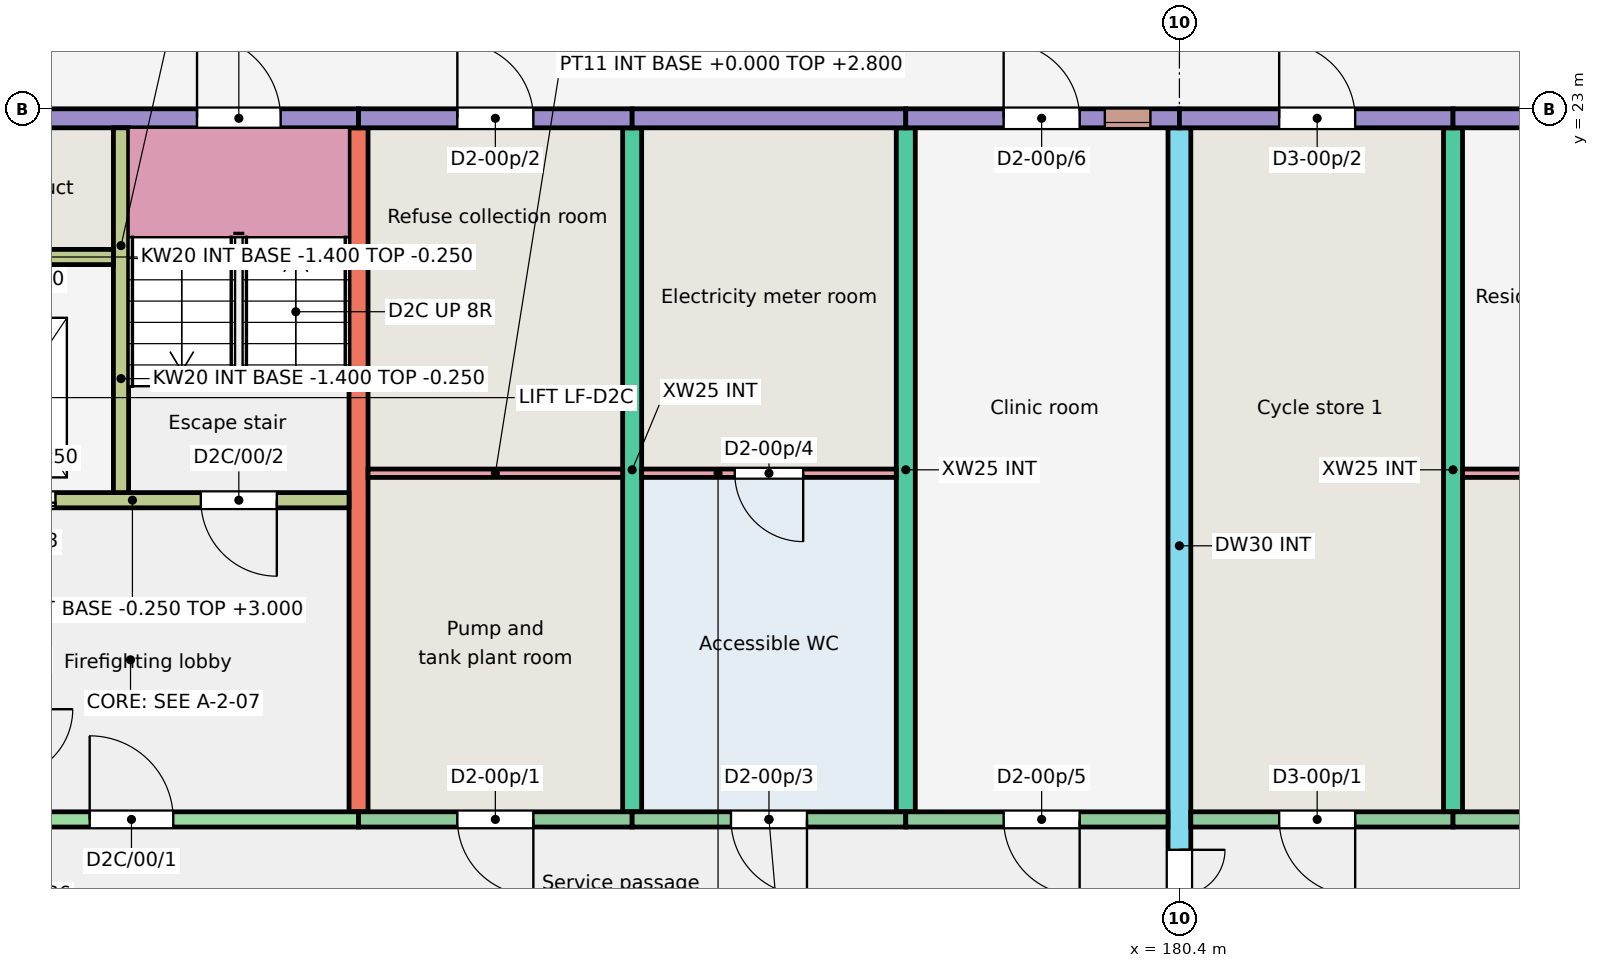
"""IFC4 building model, lengths in metres.
Left out: names, types, materials, properties, quantities, classifications, styles, units other than length and angle.
Written with IfcOpenShell. Run it as: python <this file> out.ifc"""

import sys

from ifc_helpers import new_model, si_unit, direction, frame, frame_2d, origin, place, context, subcontext, project, spatial, rectangle, extrude, element, fill, save


model = new_model("IFC4")
c1 = context("Model", 3, precision=1e-05, world=origin(), true_north=direction((0.0, 1.0)))
c2 = subcontext(c1, "Body", "Model", "MODEL_VIEW")
j1 = project(units=[si_unit("LENGTHUNIT", "METRE"), si_unit("PLANEANGLEUNIT", "RADIAN")], contexts=[c1])
p1 = place(None, origin())
s1 = spatial("IfcSite", under=j1, at=p1, CompositionType="ELEMENT")
p2 = place(p1, origin())
s2 = spatial("IfcBuilding", under=s1, at=p2, CompositionType="ELEMENT")
p3 = place(p2, origin())
s3 = spatial("IfcBuildingStorey", under=s2, at=p3, CompositionType="ELEMENT", Elevation=0.0)
for number, where, z_axis, x_axis in (
    (1, (169.6, 13.75, -0.25), (0.0, 0.0, 1.0), (0.0, 1.0, 0.0)),
    (2, (173.2, 13.75, -0.25), (0.0, 0.0, 1.0), (0.0, 1.0, 0.0)),
    (3, (176.8, 13.75, -0.25), (0.0, 0.0, 1.0), (0.0, 1.0, 0.0)),
):
    element("IfcWall", number, at=place(p3, frame(where, z_axis=z_axis, x_axis=x_axis)), inside=s3, PredefinedType="SHEAR", context=c2, shape_type="SweptSolid", body=[
        extrude(rectangle(XDim=9.0, YDim=0.25, at=frame_2d((4.5, 0.0))), origin(), (0.0, 0.0, 1.0), 3.25),
    ])
p4 = place(p3, frame((180.4, 11.75, -0.25), z_axis=(0.0, 0.0, 1.0), x_axis=(0.0, 1.0, 0.0)))
e4 = element("IfcWall", 4, at=p4, inside=s3, PredefinedType="SHEAR", context=c2, shape_type="SweptSolid", body=[
    extrude(rectangle(XDim=11.0, YDim=0.3, at=frame_2d((5.5, 0.0))), origin(), (0.0, 0.0, 1.0), 3.25),
])
p5 = place(p4, frame((0.3, 0.0, 0.25)))
e5 = element("IfcOpeningElement", 5, at=p5, cuts=e4, PredefinedType="OPENING", context=c2, shape_type="SweptSolid", body=[
    extrude(rectangle(XDim=1.2, YDim=2.1, at=frame_2d((0.6, 1.05))), frame((0.0, 0.16, 0.0), z_axis=(0.0, -1.0, 0.0), x_axis=(1.0, 0.0, 0.0)), (0.0, 0.0, 1.0), 0.32),
])
p6 = place(p3, frame((184.0, 13.75, -0.25), z_axis=(0.0, 0.0, 1.0), x_axis=(0.0, 1.0, 0.0)))
e6 = element("IfcWall", 6, at=p6, inside=s3, PredefinedType="SHEAR", context=c2, shape_type="SweptSolid", body=[
    extrude(rectangle(XDim=9.0, YDim=0.25, at=frame_2d((4.5, 0.0))), origin(), (0.0, 0.0, 1.0), 3.25),
])
p7 = place(p3, frame((163.6, 22.875, -0.25), z_axis=(0.0, 0.0, 1.0), x_axis=(1.0, 0.0, 0.0)))
e7 = element("IfcWall", 7, at=p7, inside=s3, PredefinedType="SOLIDWALL", context=c2, shape_type="SweptSolid", body=[
    extrude(rectangle(XDim=6.0, YDim=0.25, at=frame_2d((3.0, 0.0))), origin(), (0.0, 0.0, 1.0), 3.25),
])
p8 = place(p7, frame((3.875, 0.0, 0.25)))
e8 = element("IfcOpeningElement", 8, at=p8, cuts=e7, PredefinedType="OPENING", context=c2, shape_type="SweptSolid", body=[
    extrude(rectangle(XDim=1.1, YDim=2.1, at=frame_2d((0.55, 1.05))), frame((0.0, 0.135, 0.0), z_axis=(0.0, -1.0, 0.0), x_axis=(1.0, 0.0, 0.0)), (0.0, 0.0, 1.0), 0.27),
])
p9 = place(p3, frame((163.75, 13.65, -0.25), z_axis=(0.0, 0.0, 1.0), x_axis=(1.0, 0.0, 0.0)))
e9 = element("IfcWall", 9, at=p9, inside=s3, PredefinedType="SHEAR", context=c2, shape_type="SweptSolid", body=[
    extrude(rectangle(XDim=5.85, YDim=0.2, at=frame_2d((2.925, 0.0))), origin(), (0.0, 0.0, 1.0), 3.25),
])
p10 = place(p9, frame((2.312, 0.0, 0.25)))
e10 = element("IfcOpeningElement", 10, at=p10, cuts=e9, PredefinedType="OPENING", context=c2, shape_type="SweptSolid", body=[
    extrude(rectangle(XDim=1.1, YDim=2.1, at=frame_2d((0.55, 1.05))), frame((0.0, 0.11, 0.0), z_axis=(0.0, -1.0, 0.0), x_axis=(1.0, 0.0, 0.0)), (0.0, 0.0, 1.0), 0.22),
])
p11 = place(p3, frame((163.75, 17.85, -0.25), z_axis=(0.0, 0.0, 1.0), x_axis=(1.0, 0.0, 0.0)))
e11 = element("IfcWall", 11, at=p11, inside=s3, PredefinedType="SHEAR", context=c2, shape_type="SweptSolid", body=[
    extrude(rectangle(XDim=5.725, YDim=0.2, at=frame_2d((2.863, 0.0))), origin(), (0.0, 0.0, 1.0), 3.25),
])
p12 = place(p11, frame((3.775, 0.0, 0.25)))
e12 = element("IfcOpeningElement", 12, at=p12, cuts=e11, PredefinedType="OPENING", context=c2, shape_type="SweptSolid", body=[
    extrude(rectangle(XDim=1.0, YDim=2.1, at=frame_2d((0.5, 1.05))), frame((0.0, 0.11, 0.0), z_axis=(0.0, -1.0, 0.0), x_axis=(1.0, 0.0, 0.0)), (0.0, 0.0, 1.0), 0.22),
])
p13 = place(p11, frame((0.762, 0.0, 0.25)))
e13 = element("IfcOpeningElement", 13, at=p13, cuts=e11, PredefinedType="OPENING", context=c2, shape_type="SweptSolid", body=[
    extrude(rectangle(XDim=1.1, YDim=2.1, at=frame_2d((0.55, 1.05))), frame((0.0, 0.11, 0.0), z_axis=(0.0, -1.0, 0.0), x_axis=(1.0, 0.0, 0.0)), (0.0, 0.0, 1.0), 0.22),
])
p14 = place(p3, frame((166.475, 17.95, -0.25), z_axis=(0.0, 0.0, 1.0), x_axis=(0.0, 1.0, 0.0)))
e14 = element("IfcWall", 14, at=p14, inside=s3, PredefinedType="SHEAR", context=c2, shape_type="SweptSolid", body=[
    extrude(rectangle(XDim=4.8, YDim=0.2, at=frame_2d((2.4, 0.0))), origin(), (0.0, 0.0, 1.0), 3.25),
])
p15 = place(p3, frame((163.75, 21.05, -0.25), z_axis=(0.0, 0.0, 1.0), x_axis=(1.0, 0.0, 0.0)))
e15 = element("IfcWall", 15, at=p15, inside=s3, PredefinedType="SHEAR", context=c2, shape_type="SweptSolid", body=[
    extrude(rectangle(XDim=2.625, YDim=0.2, at=frame_2d((1.312, 0.0))), origin(), (0.0, 0.0, 1.0), 3.25),
])
p16 = place(p3, frame((169.6, 22.875, -0.25), z_axis=(0.0, 0.0, 1.0), x_axis=(1.0, 0.0, 0.0)))
e16 = element("IfcWall", 16, at=p16, inside=s3, PredefinedType="SOLIDWALL", context=c2, shape_type="SweptSolid", body=[
    extrude(rectangle(XDim=3.6, YDim=0.25, at=frame_2d((1.8, 0.0))), origin(), (0.0, 0.0, 1.0), 3.25),
])
p17 = place(p16, frame((1.3, 0.0, 0.25)))
e17 = element("IfcOpeningElement", 17, at=p17, cuts=e16, PredefinedType="OPENING", context=c2, shape_type="SweptSolid", body=[
    extrude(rectangle(XDim=1.0, YDim=2.1, at=frame_2d((0.5, 1.05))), frame((0.0, 0.135, 0.0), z_axis=(0.0, -1.0, 0.0), x_axis=(1.0, 0.0, 0.0)), (0.0, 0.0, 1.0), 0.27),
])
p18 = place(p3, frame((169.6, 13.65, -0.25), z_axis=(0.0, 0.0, 1.0), x_axis=(1.0, 0.0, 0.0)))
e18 = element("IfcWall", 18, at=p18, inside=s3, PredefinedType="SOLIDWALL", context=c2, shape_type="SweptSolid", body=[
    extrude(rectangle(XDim=3.6, YDim=0.2, at=frame_2d((1.8, 0.0))), origin(), (0.0, 0.0, 1.0), 3.25),
])
p19 = place(p18, frame((1.3, 0.0, 0.25)))
e19 = element("IfcOpeningElement", 19, at=p19, cuts=e18, PredefinedType="OPENING", context=c2, shape_type="SweptSolid", body=[
    extrude(rectangle(XDim=1.0, YDim=2.1, at=frame_2d((0.5, 1.05))), frame((0.0, 0.11, 0.0), z_axis=(0.0, -1.0, 0.0), x_axis=(1.0, 0.0, 0.0)), (0.0, 0.0, 1.0), 0.22),
])
p20 = place(p3, frame((173.2, 22.875, -0.25), z_axis=(0.0, 0.0, 1.0), x_axis=(1.0, 0.0, 0.0)))
e20 = element("IfcWall", 20, at=p20, inside=s3, PredefinedType="SOLIDWALL", context=c2, shape_type="SweptSolid", body=[
    extrude(rectangle(XDim=3.6, YDim=0.25, at=frame_2d((1.8, 0.0))), origin(), (0.0, 0.0, 1.0), 3.25),
])
p21 = place(p3, frame((173.2, 13.65, -0.25), z_axis=(0.0, 0.0, 1.0), x_axis=(1.0, 0.0, 0.0)))
e21 = element("IfcWall", 21, at=p21, inside=s3, PredefinedType="SOLIDWALL", context=c2, shape_type="SweptSolid", body=[
    extrude(rectangle(XDim=3.6, YDim=0.2, at=frame_2d((1.8, 0.0))), origin(), (0.0, 0.0, 1.0), 3.25),
])
p22 = place(p21, frame((1.3, 0.0, 0.25)))
e22 = element("IfcOpeningElement", 22, at=p22, cuts=e21, PredefinedType="OPENING", context=c2, shape_type="SweptSolid", body=[
    extrude(rectangle(XDim=1.0, YDim=2.1, at=frame_2d((0.5, 1.05))), frame((0.0, 0.11, 0.0), z_axis=(0.0, -1.0, 0.0), x_axis=(1.0, 0.0, 0.0)), (0.0, 0.0, 1.0), 0.22),
])
p23 = place(p3, frame((176.8, 22.875, -0.25), z_axis=(0.0, 0.0, 1.0), x_axis=(1.0, 0.0, 0.0)))
e23 = element("IfcWall", 23, at=p23, inside=s3, PredefinedType="SOLIDWALL", context=c2, shape_type="SweptSolid", body=[
    extrude(rectangle(XDim=3.6, YDim=0.25, at=frame_2d((1.8, 0.0))), origin(), (0.0, 0.0, 1.0), 3.25),
])
p24 = place(p23, frame((2.619, 0.0, 2.05)))
e24 = element("IfcOpeningElement", 24, at=p24, cuts=e23, PredefinedType="OPENING", context=c2, shape_type="SweptSolid", body=[
    extrude(rectangle(XDim=0.6, YDim=0.6, at=frame_2d((0.3, 0.3))), frame((0.0, 0.135, 0.0), z_axis=(0.0, -1.0, 0.0), x_axis=(1.0, 0.0, 0.0)), (0.0, 0.0, 1.0), 0.27),
])
p25 = place(p23, frame((1.288, 0.0, 0.25)))
e25 = element("IfcOpeningElement", 25, at=p25, cuts=e23, PredefinedType="OPENING", context=c2, shape_type="SweptSolid", body=[
    extrude(rectangle(XDim=1.0, YDim=2.1, at=frame_2d((0.5, 1.05))), frame((0.0, 0.135, 0.0), z_axis=(0.0, -1.0, 0.0), x_axis=(1.0, 0.0, 0.0)), (0.0, 0.0, 1.0), 0.27),
])
p26 = place(p3, frame((176.8, 13.65, -0.25), z_axis=(0.0, 0.0, 1.0), x_axis=(1.0, 0.0, 0.0)))
e26 = element("IfcWall", 26, at=p26, inside=s3, PredefinedType="SOLIDWALL", context=c2, shape_type="SweptSolid", body=[
    extrude(rectangle(XDim=3.45, YDim=0.2, at=frame_2d((1.725, 0.0))), origin(), (0.0, 0.0, 1.0), 3.25),
])
p27 = place(p26, frame((1.288, 0.0, 0.25)))
e27 = element("IfcOpeningElement", 27, at=p27, cuts=e26, PredefinedType="OPENING", context=c2, shape_type="SweptSolid", body=[
    extrude(rectangle(XDim=1.0, YDim=2.1, at=frame_2d((0.5, 1.05))), frame((0.0, 0.11, 0.0), z_axis=(0.0, -1.0, 0.0), x_axis=(1.0, 0.0, 0.0)), (0.0, 0.0, 1.0), 0.22),
])
p28 = place(p3, frame((180.4, 22.875, -0.25), z_axis=(0.0, 0.0, 1.0), x_axis=(1.0, 0.0, 0.0)))
e28 = element("IfcWall", 28, at=p28, inside=s3, PredefinedType="SOLIDWALL", context=c2, shape_type="SweptSolid", body=[
    extrude(rectangle(XDim=3.6, YDim=0.25, at=frame_2d((1.8, 0.0))), origin(), (0.0, 0.0, 1.0), 3.25),
])
p29 = place(p28, frame((1.312, 0.0, 0.25)))
e29 = element("IfcOpeningElement", 29, at=p29, cuts=e28, PredefinedType="OPENING", context=c2, shape_type="SweptSolid", body=[
    extrude(rectangle(XDim=1.0, YDim=2.1, at=frame_2d((0.5, 1.05))), frame((0.0, 0.135, 0.0), z_axis=(0.0, -1.0, 0.0), x_axis=(1.0, 0.0, 0.0)), (0.0, 0.0, 1.0), 0.27),
])
p30 = place(p3, frame((180.55, 13.65, -0.25), z_axis=(0.0, 0.0, 1.0), x_axis=(1.0, 0.0, 0.0)))
e30 = element("IfcWall", 30, at=p30, inside=s3, PredefinedType="SOLIDWALL", context=c2, shape_type="SweptSolid", body=[
    extrude(rectangle(XDim=3.45, YDim=0.2, at=frame_2d((1.725, 0.0))), origin(), (0.0, 0.0, 1.0), 3.25),
])
p31 = place(p30, frame((1.163, 0.0, 0.25)))
e31 = element("IfcOpeningElement", 31, at=p31, cuts=e30, PredefinedType="OPENING", context=c2, shape_type="SweptSolid", body=[
    extrude(rectangle(XDim=1.0, YDim=2.1, at=frame_2d((0.5, 1.05))), frame((0.0, 0.11, 0.0), z_axis=(0.0, -1.0, 0.0), x_axis=(1.0, 0.0, 0.0)), (0.0, 0.0, 1.0), 0.22),
])
p32 = place(p3, frame((184.0, 22.875, -0.25), z_axis=(0.0, 0.0, 1.0), x_axis=(1.0, 0.0, 0.0)))
e32 = element("IfcWall", 32, at=p32, inside=s3, PredefinedType="SOLIDWALL", context=c2, shape_type="SweptSolid", body=[
    extrude(rectangle(XDim=3.6, YDim=0.25, at=frame_2d((1.8, 0.0))), origin(), (0.0, 0.0, 1.0), 3.25),
])
p33 = place(p32, frame((1.3, 0.0, 0.25)))
e33 = element("IfcOpeningElement", 33, at=p33, cuts=e32, PredefinedType="OPENING", context=c2, shape_type="SweptSolid", body=[
    extrude(rectangle(XDim=1.0, YDim=2.1, at=frame_2d((0.5, 1.05))), frame((0.0, 0.135, 0.0), z_axis=(0.0, -1.0, 0.0), x_axis=(1.0, 0.0, 0.0)), (0.0, 0.0, 1.0), 0.27),
])
p34 = place(p3, frame((184.0, 13.65, -0.25), z_axis=(0.0, 0.0, 1.0), x_axis=(1.0, 0.0, 0.0)))
e34 = element("IfcWall", 34, at=p34, inside=s3, PredefinedType="SOLIDWALL", context=c2, shape_type="SweptSolid", body=[
    extrude(rectangle(XDim=3.6, YDim=0.2, at=frame_2d((1.8, 0.0))), origin(), (0.0, 0.0, 1.0), 3.25),
])
p35 = place(p34, frame((1.3, 0.0, 0.25)))
e35 = element("IfcOpeningElement", 35, at=p35, cuts=e34, PredefinedType="OPENING", context=c2, shape_type="SweptSolid", body=[
    extrude(rectangle(XDim=1.0, YDim=2.1, at=frame_2d((0.5, 1.05))), frame((0.0, 0.11, 0.0), z_axis=(0.0, -1.0, 0.0), x_axis=(1.0, 0.0, 0.0)), (0.0, 0.0, 1.0), 0.22),
])
for number, where, z_axis, x_axis in (
    (36, (163.6, 17.85, -1.4), (0.0, 0.0, 1.0), (1.0, 0.0, 0.0)),
    (37, (163.6, 21.05, -1.4), (0.0, 0.0, 1.0), (1.0, 0.0, 0.0)),
):
    element("IfcWall", number, at=place(p3, frame(where, z_axis=z_axis, x_axis=x_axis)), inside=s3, PredefinedType="SHEAR", context=c2, shape_type="SweptSolid", body=[
        extrude(rectangle(XDim=2.975, YDim=0.2, at=frame_2d((1.487, 0.0))), origin(), (0.0, 0.0, 1.0), 1.15),
    ])
p36 = place(p3, frame((166.475, 17.95, -1.4), z_axis=(0.0, 0.0, 1.0), x_axis=(0.0, 1.0, 0.0)))
e38 = element("IfcWall", 38, at=p36, inside=s3, PredefinedType="SHEAR", context=c2, shape_type="SweptSolid", body=[
    extrude(rectangle(XDim=3.0, YDim=0.2, at=frame_2d((1.5, 0.0))), origin(), (0.0, 0.0, 1.0), 1.15),
])
p37 = place(p3, frame((169.725, 18.205, 0.0), z_axis=(0.0, 0.0, 1.0), x_axis=(1.0, 0.0, 0.0)))
e39 = element("IfcWall", 39, at=p37, inside=s3, PredefinedType="PARTITIONING", context=c2, shape_type="SweptSolid", body=[
    extrude(rectangle(XDim=3.35, YDim=0.11, at=frame_2d((1.675, 0.0))), origin(), (0.0, 0.0, 1.0), 2.8),
])
p38 = place(p3, frame((173.325, 18.205, 0.0), z_axis=(0.0, 0.0, 1.0), x_axis=(1.0, 0.0, 0.0)))
e40 = element("IfcWall", 40, at=p38, inside=s3, PredefinedType="PARTITIONING", context=c2, shape_type="SweptSolid", body=[
    extrude(rectangle(XDim=3.35, YDim=0.11, at=frame_2d((1.675, 0.0))), origin(), (0.0, 0.0, 1.0), 2.8),
])
p39 = place(p38, frame((1.225, 0.0, 0.0)))
e41 = element("IfcOpeningElement", 41, at=p39, cuts=e40, PredefinedType="OPENING", context=c2, shape_type="SweptSolid", body=[
    extrude(rectangle(XDim=0.9, YDim=2.1, at=frame_2d((0.45, 1.05))), frame((0.0, 0.065, 0.0), z_axis=(0.0, -1.0, 0.0), x_axis=(1.0, 0.0, 0.0)), (0.0, 0.0, 1.0), 0.13),
])
p40 = place(p3, frame((184.125, 18.205, 0.0), z_axis=(0.0, 0.0, 1.0), x_axis=(1.0, 0.0, 0.0)))
e42 = element("IfcWall", 42, at=p40, inside=s3, PredefinedType="PARTITIONING", context=c2, shape_type="SweptSolid", body=[
    extrude(rectangle(XDim=3.35, YDim=0.11, at=frame_2d((1.675, 0.0))), origin(), (0.0, 0.0, 1.0), 2.8),
])
p41 = place(p24, origin())
e43 = element("IfcWindow", 43, at=p41, inside=s3, PartitioningType="SINGLE_PANEL", PredefinedType="WINDOW", context=c2, shape_type="SweptSolid", body=[
    extrude(rectangle(XDim=0.6, YDim=0.6, at=frame_2d((0.3, 0.3))), frame((0.0, -0.025, 0.0), z_axis=(0.0, -1.0, 0.0), x_axis=(1.0, 0.0, 0.0)), (0.0, 0.0, 1.0), 0.06),
])
fill(e24, e43)
p42 = place(p19, origin())
e44 = element("IfcDoor", 44, at=p42, inside=s3, OperationType="SINGLE_SWING_RIGHT", PredefinedType="DOOR", context=c2, shape_type="SweptSolid", body=[
    extrude(rectangle(XDim=1.0, YDim=2.1, at=frame_2d((0.5, 1.05))), frame((0.0, 0.025, 0.0), z_axis=(0.0, -1.0, 0.0), x_axis=(1.0, 0.0, 0.0)), (0.0, 0.0, 1.0), 0.05),
])
fill(e19, e44)
p43 = place(p17, origin())
e45 = element("IfcDoor", 45, at=p43, inside=s3, OperationType="SINGLE_SWING_LEFT", PredefinedType="DOOR", context=c2, shape_type="SweptSolid", body=[
    extrude(rectangle(XDim=1.0, YDim=2.1, at=frame_2d((0.5, 1.05))), frame((0.0, 0.025, 0.0), z_axis=(0.0, -1.0, 0.0), x_axis=(1.0, 0.0, 0.0)), (0.0, 0.0, 1.0), 0.05),
])
fill(e17, e45)
p44 = place(p22, origin())
e46 = element("IfcDoor", 46, at=p44, inside=s3, OperationType="SINGLE_SWING_RIGHT", PredefinedType="DOOR", context=c2, shape_type="SweptSolid", body=[
    extrude(rectangle(XDim=1.0, YDim=2.1, at=frame_2d((0.5, 1.05))), frame((0.0, 0.025, 0.0), z_axis=(0.0, -1.0, 0.0), x_axis=(1.0, 0.0, 0.0)), (0.0, 0.0, 1.0), 0.05),
])
fill(e22, e46)
p45 = place(p39, origin())
e47 = element("IfcDoor", 47, at=p45, inside=s3, OperationType="SINGLE_SWING_RIGHT", PredefinedType="DOOR", context=c2, shape_type="SweptSolid", body=[
    extrude(rectangle(XDim=0.9, YDim=2.1, at=frame_2d((0.45, 1.05))), frame((0.0, 0.025, 0.0), z_axis=(0.0, -1.0, 0.0), x_axis=(1.0, 0.0, 0.0)), (0.0, 0.0, 1.0), 0.05),
])
fill(e41, e47)
p46 = place(p27, origin())
e48 = element("IfcDoor", 48, at=p46, inside=s3, OperationType="SINGLE_SWING_RIGHT", PredefinedType="DOOR", context=c2, shape_type="SweptSolid", body=[
    extrude(rectangle(XDim=1.0, YDim=2.1, at=frame_2d((0.5, 1.05))), frame((0.0, 0.025, 0.0), z_axis=(0.0, -1.0, 0.0), x_axis=(1.0, 0.0, 0.0)), (0.0, 0.0, 1.0), 0.05),
])
fill(e27, e48)
p47 = place(p25, origin())
e49 = element("IfcDoor", 49, at=p47, inside=s3, OperationType="SINGLE_SWING_LEFT", PredefinedType="DOOR", context=c2, shape_type="SweptSolid", body=[
    extrude(rectangle(XDim=1.0, YDim=2.1, at=frame_2d((0.5, 1.05))), frame((0.0, 0.025, 0.0), z_axis=(0.0, -1.0, 0.0), x_axis=(1.0, 0.0, 0.0)), (0.0, 0.0, 1.0), 0.05),
])
fill(e25, e49)
p48 = place(p31, origin())
e50 = element("IfcDoor", 50, at=p48, inside=s3, OperationType="SINGLE_SWING_RIGHT", PredefinedType="DOOR", context=c2, shape_type="SweptSolid", body=[
    extrude(rectangle(XDim=1.0, YDim=2.1, at=frame_2d((0.5, 1.05))), frame((0.0, 0.025, 0.0), z_axis=(0.0, -1.0, 0.0), x_axis=(1.0, 0.0, 0.0)), (0.0, 0.0, 1.0), 0.05),
])
fill(e31, e50)
p49 = place(p29, origin())
e51 = element("IfcDoor", 51, at=p49, inside=s3, OperationType="SINGLE_SWING_LEFT", PredefinedType="DOOR", context=c2, shape_type="SweptSolid", body=[
    extrude(rectangle(XDim=1.0, YDim=2.1, at=frame_2d((0.5, 1.05))), frame((0.0, 0.025, 0.0), z_axis=(0.0, -1.0, 0.0), x_axis=(1.0, 0.0, 0.0)), (0.0, 0.0, 1.0), 0.05),
])
fill(e29, e51)
p50 = place(p10, origin())
e52 = element("IfcDoor", 52, at=p50, inside=s3, OperationType="SINGLE_SWING_LEFT", PredefinedType="DOOR", context=c2, shape_type="SweptSolid", body=[
    extrude(rectangle(XDim=1.1, YDim=2.1, at=frame_2d((0.55, 1.05))), frame((0.0, 0.025, 0.0), z_axis=(0.0, -1.0, 0.0), x_axis=(1.0, 0.0, 0.0)), (0.0, 0.0, 1.0), 0.05),
])
fill(e10, e52)
p51 = place(p12, origin())
e53 = element("IfcDoor", 53, at=p51, inside=s3, OperationType="SINGLE_SWING_RIGHT", PredefinedType="DOOR", context=c2, shape_type="SweptSolid", body=[
    extrude(rectangle(XDim=1.0, YDim=2.1, at=frame_2d((0.5, 1.05))), frame((0.0, 0.025, 0.0), z_axis=(0.0, -1.0, 0.0), x_axis=(1.0, 0.0, 0.0)), (0.0, 0.0, 1.0), 0.05),
])
fill(e12, e53)
p52 = place(p13, origin())
e54 = element("IfcDoor", 54, at=p52, inside=s3, OperationType="DOUBLE_DOOR_SLIDING", PredefinedType="DOOR", context=c2, shape_type="SweptSolid", body=[
    extrude(rectangle(XDim=1.1, YDim=2.1, at=frame_2d((0.55, 1.05))), frame((0.0, 0.025, 0.0), z_axis=(0.0, -1.0, 0.0), x_axis=(1.0, 0.0, 0.0)), (0.0, 0.0, 1.0), 0.05),
])
fill(e13, e54)
p53 = place(p8, origin())
e55 = element("IfcDoor", 55, at=p53, inside=s3, OperationType="SINGLE_SWING_LEFT", PredefinedType="DOOR", context=c2, shape_type="SweptSolid", body=[
    extrude(rectangle(XDim=1.1, YDim=2.1, at=frame_2d((0.55, 1.05))), frame((0.0, 0.025, 0.0), z_axis=(0.0, -1.0, 0.0), x_axis=(1.0, 0.0, 0.0)), (0.0, 0.0, 1.0), 0.05),
])
fill(e8, e55)
p54 = place(p5, origin())
e56 = element("IfcDoor", 56, at=p54, inside=s3, OperationType="DOUBLE_DOOR_SINGLE_SWING", PredefinedType="DOOR", context=c2, shape_type="SweptSolid", body=[
    extrude(rectangle(XDim=1.2, YDim=2.1, at=frame_2d((0.6, 1.05))), frame((0.0, 0.025, 0.0), z_axis=(0.0, -1.0, 0.0), x_axis=(1.0, 0.0, 0.0)), (0.0, 0.0, 1.0), 0.05),
])
fill(e5, e56)
save(model, sys.argv[1])
